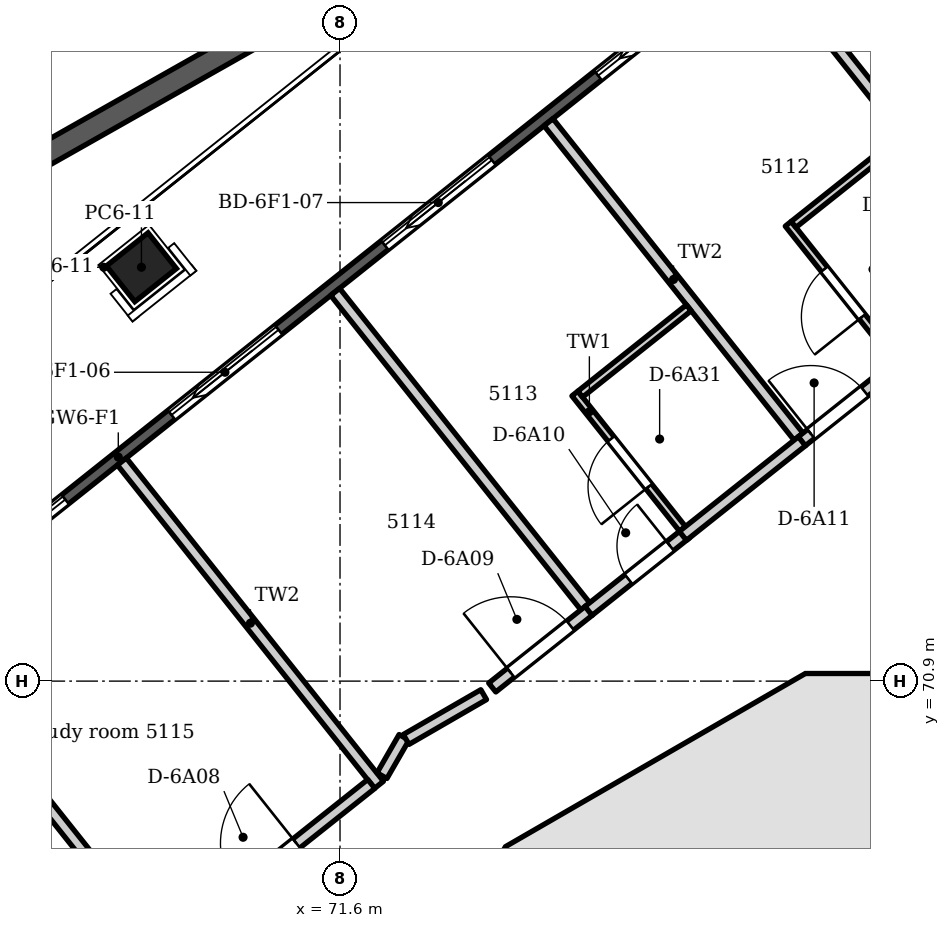
"""IFC4 building model, lengths in metres.
Left out: names, types, materials, properties, quantities, classifications, styles, units other than length and angle.
Written with IfcOpenShell. Run it as: python <this file> out.ifc"""

import sys

from ifc_helpers import new_model, si_unit, direction, frame, frame_2d, origin, origin_2d, place, context, subcontext, project, spatial, polyline, rectangle, outline, extrude, element, fill, save


model = new_model("IFC4")
c1 = context("Model", 3, precision=1e-05, world=origin(), true_north=direction((0.0, 1.0)))
c2 = subcontext(c1, "Body", "Model", "MODEL_VIEW")
j1 = project(units=[si_unit("LENGTHUNIT", "METRE"), si_unit("PLANEANGLEUNIT", "RADIAN")], contexts=[c1])
p1 = place(None, origin())
s1 = spatial("IfcSite", under=j1, at=p1, CompositionType="ELEMENT")
p2 = place(p1, origin())
s2 = spatial("IfcBuilding", under=s1, at=p2, CompositionType="ELEMENT")
p3 = place(p2, frame((0.0, 0.0, 198.0)))
s3 = spatial("IfcBuildingStorey", under=s2, at=p3, CompositionType="ELEMENT", Elevation=198.0)
p4 = place(p3, frame((82.278, 70.65, 0.0), z_axis=(0.0, 0.0, 1.0), x_axis=(-1.0, 0.0, 0.0)))
e1 = element("IfcWall", 1, at=p4, inside=s3, PredefinedType="SHEAR", context=c2, shape_type="SweptSolid", body=[
    extrude(outline(polyline([(0.0, -0.35), (4.555, -0.35), (4.368, 0.35), (0.188, 0.35), (0.0, -0.35)])), origin(), (0.0, 0.0, 1.0), 3.6),
])
p5 = place(p4, frame((1.578, 0.0, 0.0)))
e2 = element("IfcOpeningElement", 2, at=p5, cuts=e1, PredefinedType="OPENING", context=c2, shape_type="SweptSolid", body=[
    extrude(rectangle(XDim=1.4, YDim=2.1, at=frame_2d((0.7, 1.05))), frame((0.0, 0.36, 0.0), z_axis=(0.0, -1.0, 0.0), x_axis=(1.0, 0.0, 0.0)), (0.0, 0.0, 1.0), 0.72),
])
p6 = place(p3, frame((77.897, 70.697, 0.0), z_axis=(0.0, 0.0, 1.0), x_axis=(-0.866034756103, -0.499983800959, 0.0)))
e3 = element("IfcWall", 3, at=p6, inside=s3, PredefinedType="SHEAR", context=c2, shape_type="SweptSolid", body=[
    extrude(outline(polyline([(0.0, -0.35), (4.555, -0.35), (4.368, 0.35), (0.188, 0.35), (0.0, -0.35)])), origin(), (0.0, 0.0, 1.0), 3.6),
])
p7 = place(p6, frame((0.642, 0.0, 0.0)))
e4 = element("IfcOpeningElement", 4, at=p7, cuts=e3, PredefinedType="OPENING", context=c2, shape_type="SweptSolid", body=[
    extrude(rectangle(XDim=0.9, YDim=2.1, at=frame_2d((0.45, 1.05))), frame((0.0, 0.36, 0.0), z_axis=(0.0, -1.0, 0.0), x_axis=(1.0, 0.0, 0.0)), (0.0, 0.0, 1.0), 0.72),
])
p8 = place(p3, frame((74.081, 68.548, 0.0), z_axis=(0.0, 0.0, 1.0), x_axis=(-0.499983800959, -0.866034756103, 0.0)))
e5 = element("IfcWall", 5, at=p8, inside=s3, PredefinedType="SHEAR", context=c2, shape_type="SweptSolid", body=[
    extrude(outline(polyline([(0.0, -0.35), (4.555, -0.35), (4.368, 0.35), (0.188, 0.35), (0.0, -0.35)])), origin(), (0.0, 0.0, 1.0), 3.6),
])
p9 = place(p8, frame((1.077, 0.0, 0.0)))
e6 = element("IfcOpeningElement", 6, at=p9, cuts=e5, PredefinedType="OPENING", context=c2, shape_type="SweptSolid", body=[
    extrude(rectangle(XDim=2.4, YDim=2.1, at=frame_2d((1.2, 1.05))), frame((0.0, 0.36, 0.0), z_axis=(0.0, -1.0, 0.0), x_axis=(1.0, 0.0, 0.0)), (0.0, 0.0, 1.0), 0.72),
])
p10 = place(p3, frame((78.425, 63.001, 0.0), z_axis=(0.0, 0.0, 1.0), x_axis=(0.0, 1.0, 0.0)))
e7 = element("IfcWall", 7, at=p10, inside=s3, PredefinedType="SHEAR", context=c2, shape_type="SweptSolid", body=[
    extrude(rectangle(XDim=7.299, YDim=0.3, at=frame_2d((3.649, 0.0))), origin(), (0.0, 0.0, 1.0), 3.6),
])
p11 = place(p3, frame((68.987, 76.345, -0.35), z_axis=(0.0, 0.0, 1.0), x_axis=(0.782608156852, 0.622514636638, 0.0)))
e8 = element("IfcColumn", 8, at=p11, inside=s3, PredefinedType="COLUMN", context=c2, shape_type="SweptSolid", body=[
    extrude(rectangle(XDim=0.7, YDim=0.6, at=origin_2d()), origin(), (0.0, 0.0, 1.0), 3.95),
])
p12 = place(p3, frame((54.651, 62.686, 0.0), z_axis=(0.0, 0.0, 1.0), x_axis=(0.782609620341, 0.622512796776, 0.0)))
e9 = element("IfcWall", 9, at=p12, inside=s3, PredefinedType="SOLIDWALL", context=c2, shape_type="SweptSolid", body=[
    extrude(outline(polyline([(0.149, 0.075), (0.149, -0.075), (39.297, -0.075), (39.297, 0.075), (0.149, 0.075)])), origin(), (0.0, 0.0, 1.0), 3.3),
])
p13 = place(p12, frame((1.193, 0.0, 0.0)))
e10 = element("IfcOpeningElement", 10, at=p13, cuts=e9, PredefinedType="OPENING", context=c2, shape_type="SweptSolid", body=[
    extrude(rectangle(XDim=1.8, YDim=2.6, at=frame_2d((0.9, 1.3))), frame((0.0, 0.085, 0.0), z_axis=(0.0, -1.0, 0.0), x_axis=(1.0, 0.0, 0.0)), (0.0, 0.0, 1.0), 0.17),
])
p14 = place(p12, frame((4.479, 0.0, 0.0)))
e11 = element("IfcOpeningElement", 11, at=p14, cuts=e9, PredefinedType="OPENING", context=c2, shape_type="SweptSolid", body=[
    extrude(rectangle(XDim=1.8, YDim=2.6, at=frame_2d((0.9, 1.3))), frame((0.0, 0.085, 0.0), z_axis=(0.0, -1.0, 0.0), x_axis=(1.0, 0.0, 0.0)), (0.0, 0.0, 1.0), 0.17),
])
p15 = place(p12, frame((8.065, 0.0, 0.0)))
e12 = element("IfcOpeningElement", 12, at=p15, cuts=e9, PredefinedType="OPENING", context=c2, shape_type="SweptSolid", body=[
    extrude(rectangle(XDim=1.8, YDim=2.6, at=frame_2d((0.9, 1.3))), frame((0.0, 0.085, 0.0), z_axis=(0.0, -1.0, 0.0), x_axis=(1.0, 0.0, 0.0)), (0.0, 0.0, 1.0), 0.17),
])
p16 = place(p12, frame((11.651, 0.0, 0.0)))
e13 = element("IfcOpeningElement", 13, at=p16, cuts=e9, PredefinedType="OPENING", context=c2, shape_type="SweptSolid", body=[
    extrude(rectangle(XDim=1.8, YDim=2.6, at=frame_2d((0.9, 1.3))), frame((0.0, 0.085, 0.0), z_axis=(0.0, -1.0, 0.0), x_axis=(1.0, 0.0, 0.0)), (0.0, 0.0, 1.0), 0.17),
])
p17 = place(p12, frame((15.237, 0.0, 0.0)))
e14 = element("IfcOpeningElement", 14, at=p17, cuts=e9, PredefinedType="OPENING", context=c2, shape_type="SweptSolid", body=[
    extrude(rectangle(XDim=1.8, YDim=2.6, at=frame_2d((0.9, 1.3))), frame((0.0, 0.085, 0.0), z_axis=(0.0, -1.0, 0.0), x_axis=(1.0, 0.0, 0.0)), (0.0, 0.0, 1.0), 0.17),
])
p18 = place(p12, frame((18.823, 0.0, 0.0)))
e15 = element("IfcOpeningElement", 15, at=p18, cuts=e9, PredefinedType="OPENING", context=c2, shape_type="SweptSolid", body=[
    extrude(rectangle(XDim=1.8, YDim=2.6, at=frame_2d((0.9, 1.3))), frame((0.0, 0.085, 0.0), z_axis=(0.0, -1.0, 0.0), x_axis=(1.0, 0.0, 0.0)), (0.0, 0.0, 1.0), 0.17),
])
p19 = place(p12, frame((22.409, 0.0, 0.0)))
e16 = element("IfcOpeningElement", 16, at=p19, cuts=e9, PredefinedType="OPENING", context=c2, shape_type="SweptSolid", body=[
    extrude(rectangle(XDim=1.8, YDim=2.6, at=frame_2d((0.9, 1.3))), frame((0.0, 0.085, 0.0), z_axis=(0.0, -1.0, 0.0), x_axis=(1.0, 0.0, 0.0)), (0.0, 0.0, 1.0), 0.17),
])
p20 = place(p12, frame((25.995, 0.0, 0.0)))
e17 = element("IfcOpeningElement", 17, at=p20, cuts=e9, PredefinedType="OPENING", context=c2, shape_type="SweptSolid", body=[
    extrude(rectangle(XDim=1.8, YDim=2.6, at=frame_2d((0.9, 1.3))), frame((0.0, 0.085, 0.0), z_axis=(0.0, -1.0, 0.0), x_axis=(1.0, 0.0, 0.0)), (0.0, 0.0, 1.0), 0.17),
])
p21 = place(p12, frame((29.581, 0.0, 0.0)))
e18 = element("IfcOpeningElement", 18, at=p21, cuts=e9, PredefinedType="OPENING", context=c2, shape_type="SweptSolid", body=[
    extrude(rectangle(XDim=1.8, YDim=2.6, at=frame_2d((0.9, 1.3))), frame((0.0, 0.085, 0.0), z_axis=(0.0, -1.0, 0.0), x_axis=(1.0, 0.0, 0.0)), (0.0, 0.0, 1.0), 0.17),
])
p22 = place(p12, frame((33.167, 0.0, 0.0)))
e19 = element("IfcOpeningElement", 19, at=p22, cuts=e9, PredefinedType="OPENING", context=c2, shape_type="SweptSolid", body=[
    extrude(rectangle(XDim=1.8, YDim=2.6, at=frame_2d((0.9, 1.3))), frame((0.0, 0.085, 0.0), z_axis=(0.0, -1.0, 0.0), x_axis=(1.0, 0.0, 0.0)), (0.0, 0.0, 1.0), 0.17),
])
p23 = place(p12, frame((36.453, 0.0, 0.0)))
e20 = element("IfcOpeningElement", 20, at=p23, cuts=e9, PredefinedType="OPENING", context=c2, shape_type="SweptSolid", body=[
    extrude(rectangle(XDim=1.8, YDim=2.6, at=frame_2d((0.9, 1.3))), frame((0.0, 0.085, 0.0), z_axis=(0.0, -1.0, 0.0), x_axis=(1.0, 0.0, 0.0)), (0.0, 0.0, 1.0), 0.17),
])
p24 = place(p3, origin())
e21 = element("IfcWall", 21, at=p24, inside=s3, PredefinedType="PARAPET", context=c2, shape_type="SweptSolid", body=[
    extrude(outline(polyline([(75.979, 82.673), (46.956, 66.253), (47.255, 66.077), (74.479, 81.479), (75.979, 82.673)])), origin(), (0.0, 0.0, 1.0), 1.1),
])
p25 = place(p3, frame((65.923, 71.556, 0.0), z_axis=(0.0, 0.0, 1.0), x_axis=(0.622585933561, -0.782551439416, 0.0)))
e22 = element("IfcWall", 22, at=p25, inside=s3, PredefinedType="PARTITIONING", context=c2, shape_type="SweptSolid", body=[
    extrude(rectangle(XDim=5.285, YDim=0.15, at=frame_2d((2.643, 0.0))), origin(), (0.0, 0.0, 1.0), 3.3),
])
p26 = place(p3, frame((68.73, 73.789, 0.0), z_axis=(0.0, 0.0, 1.0), x_axis=(0.622457280045, -0.782653776915, 0.0)))
e23 = element("IfcWall", 23, at=p26, inside=s3, PredefinedType="PARTITIONING", context=c2, shape_type="SweptSolid", body=[
    extrude(rectangle(XDim=5.435, YDim=0.15, at=frame_2d((2.717, 0.0))), origin(), (0.0, 0.0, 1.0), 3.3),
])
p27 = place(p3, frame((69.257, 67.359, 0.0), z_axis=(0.0, 0.0, 1.0), x_axis=(0.782922929563, 0.622118707615, 0.0)))
e24 = element("IfcWall", 24, at=p27, inside=s3, PredefinedType="PARTITIONING", context=c2, shape_type="SweptSolid", body=[
    extrude(rectangle(XDim=3.518, YDim=0.15, at=frame_2d((1.759, 0.0))), origin(), (0.0, 0.0, 1.0), 3.3),
])
p28 = place(p27, frame((1.261, 0.0, 0.0)))
e25 = element("IfcOpeningElement", 25, at=p28, cuts=e24, PredefinedType="OPENING", context=c2, shape_type="SweptSolid", body=[
    extrude(rectangle(XDim=1.0, YDim=2.1, at=frame_2d((0.5, 1.05))), frame((0.0, 0.085, 0.0), z_axis=(0.0, -1.0, 0.0), x_axis=(1.0, 0.0, 0.0)), (0.0, 0.0, 1.0), 0.17),
])
p29 = place(p3, frame((71.536, 76.021, 0.0), z_axis=(0.0, 0.0, 1.0), x_axis=(0.622565407695, -0.782567769041, 0.0)))
e26 = element("IfcWall", 26, at=p29, inside=s3, PredefinedType="PARTITIONING", context=c2, shape_type="SweptSolid", body=[
    extrude(rectangle(XDim=5.36, YDim=0.15, at=frame_2d((2.68, 0.0))), origin(), (0.0, 0.0, 1.0), 3.3),
])
p30 = place(p3, frame((72.152, 69.656, 0.0), z_axis=(0.0, 0.0, 1.0), x_axis=(0.499165076137, 0.866506910973, 0.0)))
e27 = element("IfcWall", 27, at=p30, inside=s3, PredefinedType="PARTITIONING", context=c2, shape_type="SweptSolid", body=[
    extrude(rectangle(XDim=0.582, YDim=0.15, at=frame_2d((0.291, 0.0))), origin(), (0.0, 0.0, 1.0), 3.3),
])
p31 = place(p3, frame((72.47, 70.133, 0.0), z_axis=(0.0, 0.0, 1.0), x_axis=(0.865861083349, 0.5002845034, 0.0)))
e28 = element("IfcWall", 28, at=p31, inside=s3, PredefinedType="PARTITIONING", context=c2, shape_type="SweptSolid", body=[
    extrude(rectangle(XDim=1.178, YDim=0.15, at=frame_2d((0.589, 0.0))), origin(), (0.0, 0.0, 1.0), 3.3),
])
p32 = place(p3, frame((73.603, 70.816, 0.0), z_axis=(0.0, 0.0, 1.0), x_axis=(0.782783875515, 0.622293663983, 0.0)))
e29 = element("IfcWall", 29, at=p32, inside=s3, PredefinedType="PARTITIONING", context=c2, shape_type="SweptSolid", body=[
    extrude(rectangle(XDim=1.626, YDim=0.15, at=frame_2d((0.813, 0.0))), origin(), (0.0, 0.0, 1.0), 3.3),
])
p33 = place(p32, frame((0.311, 0.0, 0.0)))
e30 = element("IfcOpeningElement", 30, at=p33, cuts=e29, PredefinedType="OPENING", context=c2, shape_type="SweptSolid", body=[
    extrude(rectangle(XDim=1.0, YDim=2.1, at=frame_2d((0.5, 1.05))), frame((0.0, 0.085, 0.0), z_axis=(0.0, -1.0, 0.0), x_axis=(1.0, 0.0, 0.0)), (0.0, 0.0, 1.0), 0.17),
])
p34 = place(p3, frame((74.343, 78.253, 0.0), z_axis=(0.0, 0.0, 1.0), x_axis=(0.622444463897, -0.782663969634, 0.0)))
e31 = element("IfcWall", 31, at=p34, inside=s3, PredefinedType="PARTITIONING", context=c2, shape_type="SweptSolid", body=[
    extrude(rectangle(XDim=5.284, YDim=0.15, at=frame_2d((2.642, 0.0))), origin(), (0.0, 0.0, 1.0), 3.3),
])
p35 = place(p3, frame((74.69, 74.683, 0.0), z_axis=(0.0, 0.0, 1.0), x_axis=(0.622507134747, -0.782614124067, 0.0)))
e32 = element("IfcWall", 32, at=p35, inside=s3, PredefinedType="PARTITIONING", context=c2, shape_type="SweptSolid", body=[
    extrude(rectangle(XDim=2.275, YDim=0.1, at=frame_2d((1.138, 0.0))), origin(), (0.0, 0.0, 1.0), 3.3),
])
p36 = place(p35, frame((0.763, 0.0, 0.0)))
e33 = element("IfcOpeningElement", 33, at=p36, cuts=e32, PredefinedType="OPENING", context=c2, shape_type="SweptSolid", body=[
    extrude(rectangle(XDim=0.8, YDim=2.1, at=frame_2d((0.4, 1.05))), frame((0.0, 0.06, 0.0), z_axis=(0.0, -1.0, 0.0), x_axis=(1.0, 0.0, 0.0)), (0.0, 0.0, 1.0), 0.12),
])
p37 = place(p3, frame((74.76, 74.675, 0.0), z_axis=(0.0, 0.0, 1.0), x_axis=(0.782562542096, 0.622571977934, 0.0)))
e34 = element("IfcWall", 34, at=p37, inside=s3, PredefinedType="PARTITIONING", context=c2, shape_type="SweptSolid", body=[
    extrude(rectangle(XDim=1.825, YDim=0.1, at=frame_2d((0.913, 0.0))), origin(), (0.0, 0.0, 1.0), 3.3),
])
p38 = place(p3, frame((74.87, 71.824, 0.0), z_axis=(0.0, 0.0, 1.0), x_axis=(0.782865951336, 0.622190406739, 0.0)))
e35 = element("IfcWall", 35, at=p38, inside=s3, PredefinedType="PARTITIONING", context=c2, shape_type="SweptSolid", body=[
    extrude(rectangle(XDim=1.643, YDim=0.15, at=frame_2d((0.821, 0.0))), origin(), (0.0, 0.0, 1.0), 3.3),
])
p39 = place(p38, frame((0.671, 0.0, 0.0)))
e36 = element("IfcOpeningElement", 36, at=p39, cuts=e35, PredefinedType="OPENING", context=c2, shape_type="SweptSolid", body=[
    extrude(rectangle(XDim=0.7, YDim=2.1, at=frame_2d((0.35, 1.05))), frame((0.0, 0.085, 0.0), z_axis=(0.0, -1.0, 0.0), x_axis=(1.0, 0.0, 0.0)), (0.0, 0.0, 1.0), 0.17),
])
p40 = place(p3, frame((76.111, 72.811, 0.0), z_axis=(0.0, 0.0, 1.0), x_axis=(0.782704744495, 0.622393189989, 0.0)))
e37 = element("IfcWall", 37, at=p40, inside=s3, PredefinedType="PARTITIONING", context=c2, shape_type="SweptSolid", body=[
    extrude(rectangle(XDim=2.007, YDim=0.15, at=frame_2d((1.003, 0.0))), origin(), (0.0, 0.0, 1.0), 3.3),
])
p41 = place(p3, frame((77.149, 80.486, 0.0), z_axis=(0.0, 0.0, 1.0), x_axis=(0.622587598128, -0.782550115109, 0.0)))
e38 = element("IfcWall", 38, at=p41, inside=s3, PredefinedType="PARTITIONING", context=c2, shape_type="SweptSolid", body=[
    extrude(rectangle(XDim=5.36, YDim=0.15, at=frame_2d((2.68, 0.0))), origin(), (0.0, 0.0, 1.0), 3.3),
])
p42 = place(p3, frame((77.497, 76.916, 0.0), z_axis=(0.0, 0.0, 1.0), x_axis=(0.622625135388, -0.78252024944, 0.0)))
e39 = element("IfcWall", 39, at=p42, inside=s3, PredefinedType="PARTITIONING", context=c2, shape_type="SweptSolid", body=[
    extrude(rectangle(XDim=2.275, YDim=0.1, at=frame_2d((1.138, 0.0))), origin(), (0.0, 0.0, 1.0), 3.3),
])
p43 = place(p42, frame((0.763, 0.0, 0.0)))
e40 = element("IfcOpeningElement", 40, at=p43, cuts=e39, PredefinedType="OPENING", context=c2, shape_type="SweptSolid", body=[
    extrude(rectangle(XDim=0.8, YDim=2.1, at=frame_2d((0.4, 1.05))), frame((0.0, 0.06, 0.0), z_axis=(0.0, -1.0, 0.0), x_axis=(1.0, 0.0, 0.0)), (0.0, 0.0, 1.0), 0.12),
])
p44 = place(p3, frame((77.567, 76.908, 0.0), z_axis=(0.0, 0.0, 1.0), x_axis=(0.782627716851, 0.622490045557, 0.0)))
e41 = element("IfcWall", 41, at=p44, inside=s3, PredefinedType="PARTITIONING", context=c2, shape_type="SweptSolid", body=[
    extrude(rectangle(XDim=1.825, YDim=0.1, at=frame_2d((0.913, 0.0))), origin(), (0.0, 0.0, 1.0), 3.3),
])
p45 = place(p3, frame((77.676, 74.056, 0.0), z_axis=(0.0, 0.0, 1.0), x_axis=(0.782734219596, 0.622356121102, 0.0)))
e42 = element("IfcWall", 42, at=p45, inside=s3, PredefinedType="PARTITIONING", context=c2, shape_type="SweptSolid", body=[
    extrude(rectangle(XDim=1.644, YDim=0.15, at=frame_2d((0.822, 0.0))), origin(), (0.0, 0.0, 1.0), 3.3),
])
p46 = place(p45, frame((0.154, 0.0, 0.0)))
e43 = element("IfcOpeningElement", 43, at=p46, cuts=e42, PredefinedType="OPENING", context=c2, shape_type="SweptSolid", body=[
    extrude(rectangle(XDim=0.9, YDim=2.1, at=frame_2d((0.45, 1.05))), frame((0.0, 0.085, 0.0), z_axis=(0.0, -1.0, 0.0), x_axis=(1.0, 0.0, 0.0)), (0.0, 0.0, 1.0), 0.17),
])
p47 = place(p3, frame((75.251, 66.974, 0.0), z_axis=(0.0, 0.0, 1.0), x_axis=(0.500136062276, 0.86594683394, 0.0)))
e44 = element("IfcWall", 44, at=p47, inside=s3, PredefinedType="PARTITIONING", context=c2, shape_type="SweptSolid", body=[
    extrude(rectangle(XDim=2.299, YDim=0.2, at=frame_2d((1.149, 0.0))), origin(), (0.0, 0.0, 1.0), 3.3),
])
p48 = place(p3, frame((78.225, 68.028, 0.0), z_axis=(0.0, 0.0, 1.0), x_axis=(-0.866130725101, 0.499817533742, 0.0)))
e45 = element("IfcWall", 45, at=p48, inside=s3, PredefinedType="PARTITIONING", context=c2, shape_type="SweptSolid", body=[
    extrude(rectangle(XDim=2.149, YDim=0.2, at=frame_2d((1.074, 0.0))), origin(), (0.0, 0.0, 1.0), 3.3),
])
p49 = place(p17, origin())
e46 = element("IfcDoor", 46, at=p49, inside=s3, OperationType="SLIDING_TO_LEFT", PredefinedType="DOOR", context=c2, shape_type="SweptSolid", body=[
    extrude(rectangle(XDim=1.8, YDim=2.6, at=frame_2d((0.9, 1.3))), frame((0.0, 0.025, 0.0), z_axis=(0.0, -1.0, 0.0), x_axis=(1.0, 0.0, 0.0)), (0.0, 0.0, 1.0), 0.05),
])
fill(e14, e46)
p50 = place(p18, origin())
e47 = element("IfcDoor", 47, at=p50, inside=s3, OperationType="SLIDING_TO_LEFT", PredefinedType="DOOR", context=c2, shape_type="SweptSolid", body=[
    extrude(rectangle(XDim=1.8, YDim=2.6, at=frame_2d((0.9, 1.3))), frame((0.0, 0.025, 0.0), z_axis=(0.0, -1.0, 0.0), x_axis=(1.0, 0.0, 0.0)), (0.0, 0.0, 1.0), 0.05),
])
fill(e15, e47)
p51 = place(p19, origin())
e48 = element("IfcDoor", 48, at=p51, inside=s3, OperationType="SLIDING_TO_LEFT", PredefinedType="DOOR", context=c2, shape_type="SweptSolid", body=[
    extrude(rectangle(XDim=1.8, YDim=2.6, at=frame_2d((0.9, 1.3))), frame((0.0, 0.025, 0.0), z_axis=(0.0, -1.0, 0.0), x_axis=(1.0, 0.0, 0.0)), (0.0, 0.0, 1.0), 0.05),
])
fill(e16, e48)
p52 = place(p20, origin())
e49 = element("IfcDoor", 49, at=p52, inside=s3, OperationType="SLIDING_TO_LEFT", PredefinedType="DOOR", context=c2, shape_type="SweptSolid", body=[
    extrude(rectangle(XDim=1.8, YDim=2.6, at=frame_2d((0.9, 1.3))), frame((0.0, 0.025, 0.0), z_axis=(0.0, -1.0, 0.0), x_axis=(1.0, 0.0, 0.0)), (0.0, 0.0, 1.0), 0.05),
])
fill(e17, e49)
p53 = place(p28, origin())
e50 = element("IfcDoor", 50, at=p53, inside=s3, OperationType="SINGLE_SWING_RIGHT", PredefinedType="DOOR", context=c2, shape_type="SweptSolid", body=[
    extrude(rectangle(XDim=1.0, YDim=2.1, at=frame_2d((0.5, 1.05))), frame((0.0, 0.025, 0.0), z_axis=(0.0, -1.0, 0.0), x_axis=(1.0, 0.0, 0.0)), (0.0, 0.0, 1.0), 0.05),
])
fill(e25, e50)
p54 = place(p33, origin())
e51 = element("IfcDoor", 51, at=p54, inside=s3, OperationType="SINGLE_SWING_LEFT", PredefinedType="DOOR", context=c2, shape_type="SweptSolid", body=[
    extrude(rectangle(XDim=1.0, YDim=2.1, at=frame_2d((0.5, 1.05))), frame((0.0, 0.025, 0.0), z_axis=(0.0, -1.0, 0.0), x_axis=(1.0, 0.0, 0.0)), (0.0, 0.0, 1.0), 0.05),
])
fill(e30, e51)
p55 = place(p39, origin())
e52 = element("IfcDoor", 52, at=p55, inside=s3, OperationType="SINGLE_SWING_RIGHT", PredefinedType="DOOR", context=c2, shape_type="SweptSolid", body=[
    extrude(rectangle(XDim=0.7, YDim=2.1, at=frame_2d((0.35, 1.05))), frame((0.0, 0.025, 0.0), z_axis=(0.0, -1.0, 0.0), x_axis=(1.0, 0.0, 0.0)), (0.0, 0.0, 1.0), 0.05),
])
fill(e36, e52)
p56 = place(p46, origin())
e53 = element("IfcDoor", 53, at=p56, inside=s3, OperationType="SINGLE_SWING_LEFT", PredefinedType="DOOR", context=c2, shape_type="SweptSolid", body=[
    extrude(rectangle(XDim=0.9, YDim=2.1, at=frame_2d((0.45, 1.05))), frame((0.0, 0.025, 0.0), z_axis=(0.0, -1.0, 0.0), x_axis=(1.0, 0.0, 0.0)), (0.0, 0.0, 1.0), 0.05),
])
fill(e43, e53)
p57 = place(p36, frame((0.8, 0.0, 0.0), z_axis=(0.0, 0.0, 1.0), x_axis=(-1.0, 0.0, 0.0)))
e54 = element("IfcDoor", 54, at=p57, inside=s3, OperationType="SINGLE_SWING_LEFT", PredefinedType="DOOR", context=c2, shape_type="SweptSolid", body=[
    extrude(rectangle(XDim=0.8, YDim=2.1, at=frame_2d((0.4, 1.05))), frame((0.0, 0.025, 0.0), z_axis=(0.0, -1.0, 0.0), x_axis=(1.0, 0.0, 0.0)), (0.0, 0.0, 1.0), 0.05),
])
fill(e33, e54)
p58 = place(p43, frame((0.8, 0.0, 0.0), z_axis=(0.0, 0.0, 1.0), x_axis=(-1.0, 0.0, 0.0)))
e55 = element("IfcDoor", 55, at=p58, inside=s3, OperationType="SINGLE_SWING_LEFT", PredefinedType="DOOR", context=c2, shape_type="SweptSolid", body=[
    extrude(rectangle(XDim=0.8, YDim=2.1, at=frame_2d((0.4, 1.05))), frame((0.0, 0.025, 0.0), z_axis=(0.0, -1.0, 0.0), x_axis=(1.0, 0.0, 0.0)), (0.0, 0.0, 1.0), 0.05),
])
fill(e40, e55)
p59 = place(p7, origin())
e56 = element("IfcDoor", 56, at=p59, inside=s3, OperationType="SINGLE_SWING_LEFT", PredefinedType="DOOR", context=c2, shape_type="SweptSolid", body=[
    extrude(rectangle(XDim=0.9, YDim=2.1, at=frame_2d((0.45, 1.05))), frame((0.0, 0.075, 0.0), z_axis=(0.0, -1.0, 0.0), x_axis=(1.0, 0.0, 0.0)), (0.0, 0.0, 1.0), 0.05),
])
fill(e4, e56)
save(model, sys.argv[1])
